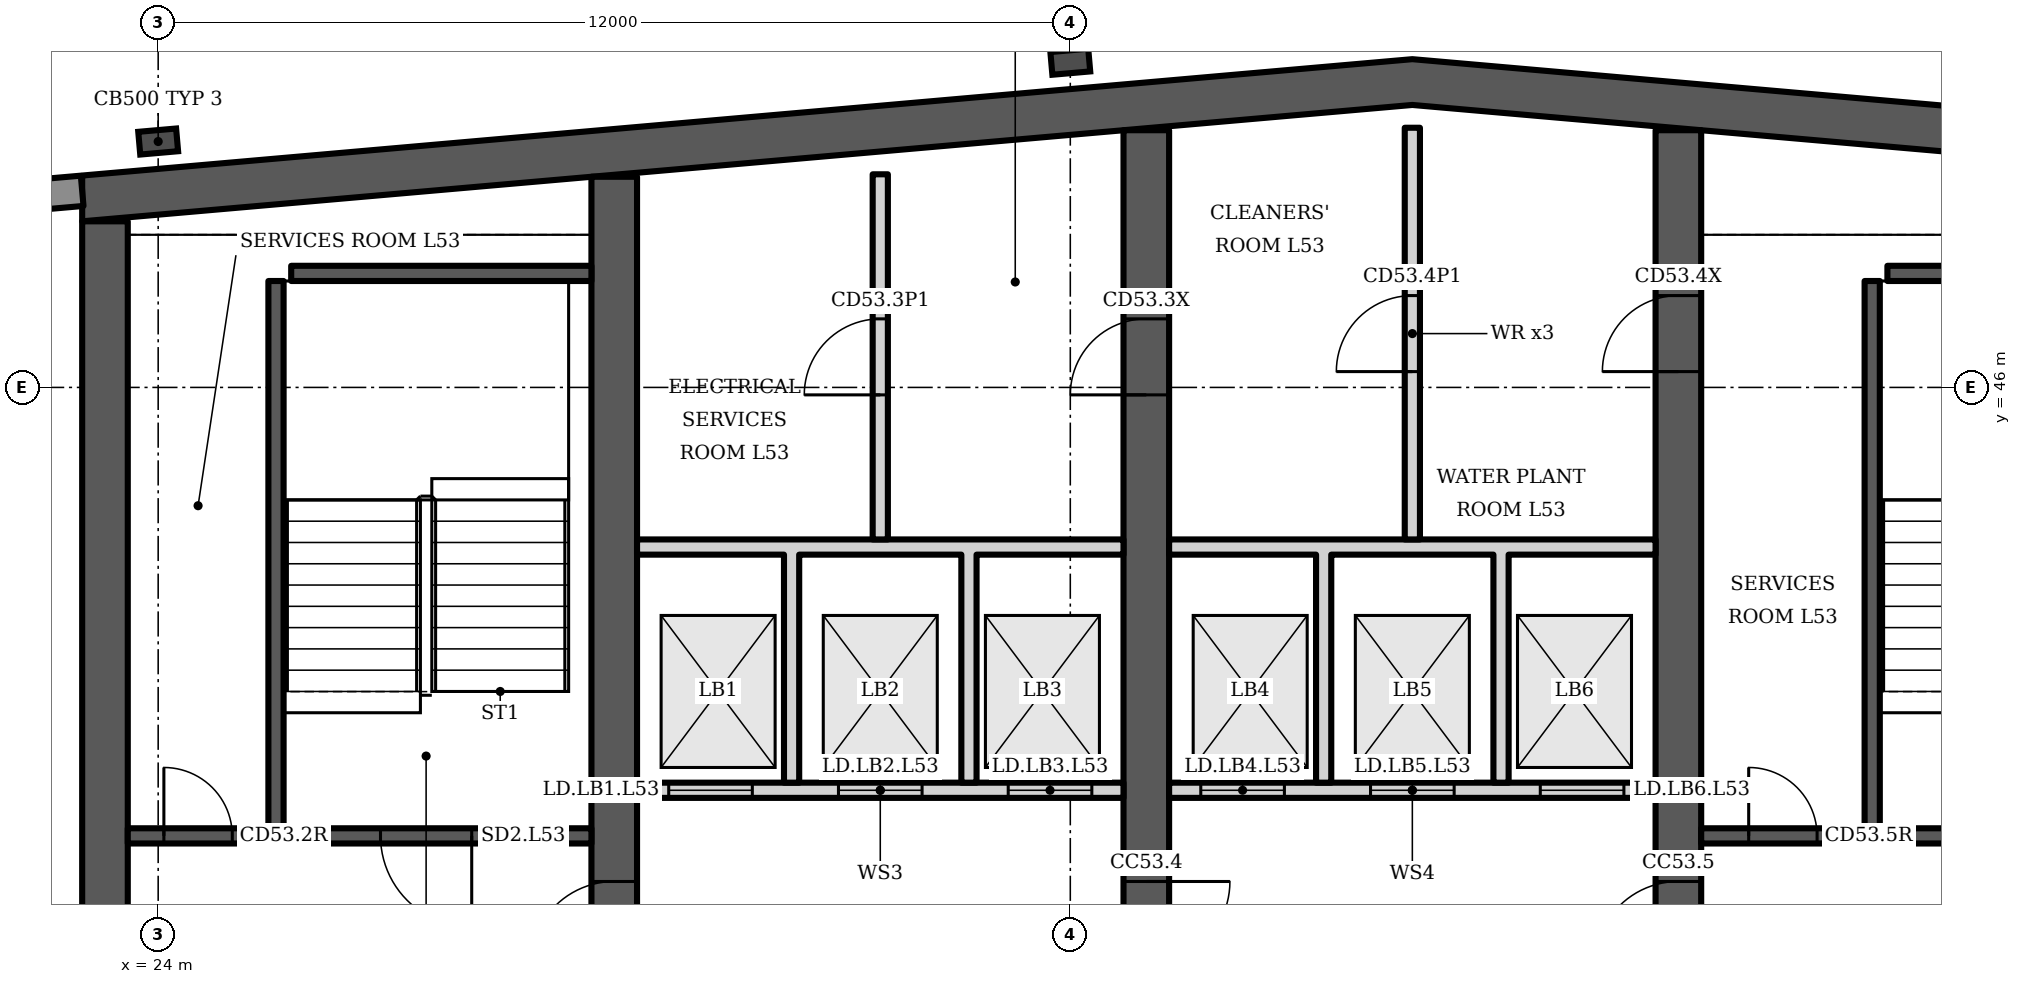
"""IFC4 building model, lengths in metres.
Left out: names, types, materials, properties, quantities, classifications, styles, units other than length and angle.
Written with IfcOpenShell. Run it as: python <this file> out.ifc"""

import sys

from ifc_helpers import new_model, si_unit, direction, frame, frame_2d, origin, origin_2d, place, context, subcontext, project, spatial, polyline, rectangle, i_section, outline, extrude, element, fill, save


model = new_model("IFC4")
c1 = context("Model", 3, precision=1e-05, world=origin(), true_north=direction((0.0, 1.0)))
c2 = subcontext(c1, "Body", "Model", "MODEL_VIEW")
j1 = project(units=[si_unit("LENGTHUNIT", "METRE"), si_unit("PLANEANGLEUNIT", "RADIAN")], contexts=[c1])
p1 = place(None, origin())
s1 = spatial("IfcSite", under=j1, at=p1, CompositionType="ELEMENT")
p2 = place(p1, origin())
s2 = spatial("IfcBuilding", under=s1, at=p2, CompositionType="ELEMENT")
p3 = place(p2, frame((0.0, 0.0, 214.3)))
s3 = spatial("IfcBuildingStorey", under=s2, at=p3, CompositionType="ELEMENT", Elevation=214.3)
p4 = place(p3, frame((0.0, 0.0, -0.0)))
e1 = element("IfcWall", 1, at=p4, inside=s3, PredefinedType="SHEAR", context=c2, shape_type="SweptSolid", body=[
    extrude(outline(polyline([(23.0, 48.185), (40.5, 49.716), (58.0, 48.185), (58.0, 48.787), (40.5, 50.318), (23.0, 48.787), (23.0, 48.185)])), origin(), (0.0, 0.0, 1.0), 3.6),
])
p5 = place(p3, frame((23.3, 34.6, 0.0), z_axis=(0.0, 0.0, 1.0), x_axis=(0.0, 1.0, 0.0)))
e2 = element("IfcWall", 2, at=p5, inside=s3, PredefinedType="SHEAR", context=c2, shape_type="SweptSolid", body=[
    extrude(rectangle(XDim=13.585, YDim=0.6, at=frame_2d((6.792, 0.0))), origin(), (0.0, 0.0, 1.0), 3.6),
])
p6 = place(p3, frame((30.0, 34.6, 0.0), z_axis=(0.0, 0.0, 1.0), x_axis=(0.0, 1.0, 0.0)))
e3 = element("IfcWall", 3, at=p6, inside=s3, PredefinedType="SHEAR", context=c2, shape_type="SweptSolid", body=[
    extrude(rectangle(XDim=14.171, YDim=0.6, at=frame_2d((7.085, 0.0))), origin(), (0.0, 0.0, 1.0), 3.6),
])
p7 = place(p6, frame((3.8, 0.0, 0.0)))
e4 = element("IfcOpeningElement", 4, at=p7, cuts=e3, PredefinedType="OPENING", context=c2, shape_type="SweptSolid", body=[
    extrude(rectangle(XDim=1.1, YDim=2.1, at=frame_2d((0.55, 1.05))), frame((0.0, 0.31, 0.0), z_axis=(0.0, -1.0, 0.0), x_axis=(1.0, 0.0, 0.0)), (0.0, 0.0, 1.0), 0.62),
])
p8 = place(p3, frame((37.0, 34.6, 0.0), z_axis=(0.0, 0.0, 1.0), x_axis=(0.0, 1.0, 0.0)))
e5 = element("IfcWall", 5, at=p8, inside=s3, PredefinedType="SHEAR", context=c2, shape_type="SweptSolid", body=[
    extrude(rectangle(XDim=14.784, YDim=0.6, at=frame_2d((7.392, 0.0))), origin(), (0.0, 0.0, 1.0), 3.6),
])
p9 = place(p8, frame((11.302, 0.0, 0.0)))
e6 = element("IfcOpeningElement", 6, at=p9, cuts=e5, PredefinedType="OPENING", context=c2, shape_type="SweptSolid", body=[
    extrude(rectangle(XDim=1.0, YDim=2.1, at=frame_2d((0.5, 1.05))), frame((0.0, 0.31, 0.0), z_axis=(0.0, -1.0, 0.0), x_axis=(1.0, 0.0, 0.0)), (0.0, 0.0, 1.0), 0.62),
])
p10 = place(p8, frame((3.8, 0.0, 0.0)))
e7 = element("IfcOpeningElement", 7, at=p10, cuts=e5, PredefinedType="OPENING", context=c2, shape_type="SweptSolid", body=[
    extrude(rectangle(XDim=1.1, YDim=2.1, at=frame_2d((0.55, 1.05))), frame((0.0, 0.31, 0.0), z_axis=(0.0, -1.0, 0.0), x_axis=(1.0, 0.0, 0.0)), (0.0, 0.0, 1.0), 0.62),
])
p11 = place(p3, frame((44.0, 34.6, 0.0), z_axis=(0.0, 0.0, 1.0), x_axis=(0.0, 1.0, 0.0)))
e8 = element("IfcWall", 8, at=p11, inside=s3, PredefinedType="SHEAR", context=c2, shape_type="SweptSolid", body=[
    extrude(rectangle(XDim=14.784, YDim=0.6, at=frame_2d((7.392, 0.0))), origin(), (0.0, 0.0, 1.0), 3.6),
])
p12 = place(p11, frame((11.608, 0.0, 0.0)))
e9 = element("IfcOpeningElement", 9, at=p12, cuts=e8, PredefinedType="OPENING", context=c2, shape_type="SweptSolid", body=[
    extrude(rectangle(XDim=1.0, YDim=2.1, at=frame_2d((0.5, 1.05))), frame((0.0, 0.31, 0.0), z_axis=(0.0, -1.0, 0.0), x_axis=(1.0, 0.0, 0.0)), (0.0, 0.0, 1.0), 0.62),
])
p13 = place(p11, frame((3.8, 0.0, 0.0)))
e10 = element("IfcOpeningElement", 10, at=p13, cuts=e8, PredefinedType="OPENING", context=c2, shape_type="SweptSolid", body=[
    extrude(rectangle(XDim=1.1, YDim=2.1, at=frame_2d((0.55, 1.05))), frame((0.0, 0.31, 0.0), z_axis=(0.0, -1.0, 0.0), x_axis=(1.0, 0.0, 0.0)), (0.0, 0.0, 1.0), 0.62),
])
for number, where, z_axis, x_axis in (
    (11, (24.0, 49.235, 0.0), (0.0, 0.0, 1.0), (-0.087, 0.996, 0.0)),
    (12, (36.0, 50.285, 0.0), (0.0, 0.0, 1.0), (-0.087, 0.996, 0.0)),
):
    element("IfcColumn", number, at=place(p3, frame(where, z_axis=z_axis, x_axis=x_axis)), inside=s3, PredefinedType="COLUMN", context=c2, shape_type="SweptSolid", body=[
        extrude(i_section(OverallWidth=0.3, OverallDepth=0.5, WebThickness=0.014, FlangeThickness=0.028, FilletRadius=0.027, at=origin_2d()), origin(), (0.0, 0.0, 1.0), 3.6),
    ])
p14 = place(p3, frame((23.0, 48.587, 0.0), z_axis=(0.0, 0.0, 1.0), x_axis=(-0.996194, -0.087168, 0.0)))
e13 = element("IfcWall", 13, at=p14, inside=s3, PredefinedType="SOLIDWALL", context=c2, shape_type="SweptSolid", body=[
    extrude(rectangle(XDim=2.994, YDim=0.4, at=frame_2d((1.497, 0.0))), origin(), (0.0, 0.0, 1.0), 3.2),
])
p15 = place(p3, frame((23.6, 40.1, 0.0), z_axis=(0.0, 0.0, 1.0), x_axis=(1.0, 0.0, 0.0)))
e14 = element("IfcWall", 14, at=p15, inside=s3, PredefinedType="SHEAR", context=c2, shape_type="SweptSolid", body=[
    extrude(rectangle(XDim=6.1, YDim=0.2, at=frame_2d((3.05, 0.0))), origin(), (0.0, 0.0, 1.0), 3.2),
])
p16 = place(p15, frame((3.325, 0.0, 0.0)))
e15 = element("IfcOpeningElement", 15, at=p16, cuts=e14, PredefinedType="OPENING", context=c2, shape_type="SweptSolid", body=[
    extrude(rectangle(XDim=1.2, YDim=2.1, at=frame_2d((0.6, 1.05))), frame((0.0, 0.11, 0.0), z_axis=(0.0, -1.0, 0.0), x_axis=(1.0, 0.0, 0.0)), (0.0, 0.0, 1.0), 0.22),
])
p17 = place(p15, frame((0.475, 0.0, 0.0)))
e16 = element("IfcOpeningElement", 16, at=p17, cuts=e14, PredefinedType="OPENING", context=c2, shape_type="SweptSolid", body=[
    extrude(rectangle(XDim=0.9, YDim=2.1, at=frame_2d((0.45, 1.05))), frame((0.0, 0.11, 0.0), z_axis=(0.0, -1.0, 0.0), x_axis=(1.0, 0.0, 0.0)), (0.0, 0.0, 1.0), 0.22),
])
p18 = place(p3, frame((25.55, 40.2, 0.0), z_axis=(0.0, 0.0, 1.0), x_axis=(0.0, 1.0, 0.0)))
e17 = element("IfcWall", 17, at=p18, inside=s3, PredefinedType="SHEAR", context=c2, shape_type="SweptSolid", body=[
    extrude(rectangle(XDim=7.2, YDim=0.2, at=frame_2d((3.6, 0.0))), origin(), (0.0, 0.0, 1.0), 3.2),
])
p19 = place(p3, frame((25.75, 47.5, 0.0), z_axis=(0.0, 0.0, 1.0), x_axis=(1.0, 0.0, 0.0)))
e18 = element("IfcWall", 18, at=p19, inside=s3, PredefinedType="SHEAR", context=c2, shape_type="SweptSolid", body=[
    extrude(rectangle(XDim=3.95, YDim=0.2, at=frame_2d((1.975, 0.0))), origin(), (0.0, 0.0, 1.0), 3.2),
])
p20 = place(p3, frame((30.3, 40.7, 0.0), z_axis=(0.0, 0.0, 1.0), x_axis=(1.0, 0.0, 0.0)))
e19 = element("IfcWall", 19, at=p20, inside=s3, PredefinedType="PARTITIONING", context=c2, shape_type="SweptSolid", body=[
    extrude(rectangle(XDim=6.4, YDim=0.2, at=frame_2d((3.2, 0.0))), origin(), (0.0, 0.0, 1.0), 3.2),
])
p21 = place(p20, frame((0.417, 0.0, 0.0)))
e20 = element("IfcOpeningElement", 20, at=p21, cuts=e19, PredefinedType="OPENING", context=c2, shape_type="SweptSolid", body=[
    extrude(rectangle(XDim=1.1, YDim=2.1, at=frame_2d((0.55, 1.05))), frame((0.0, 0.11, 0.0), z_axis=(0.0, -1.0, 0.0), x_axis=(1.0, 0.0, 0.0)), (0.0, 0.0, 1.0), 0.22),
])
p22 = place(p20, frame((2.65, 0.0, 0.0)))
e21 = element("IfcOpeningElement", 21, at=p22, cuts=e19, PredefinedType="OPENING", context=c2, shape_type="SweptSolid", body=[
    extrude(rectangle(XDim=1.1, YDim=2.1, at=frame_2d((0.55, 1.05))), frame((0.0, 0.11, 0.0), z_axis=(0.0, -1.0, 0.0), x_axis=(1.0, 0.0, 0.0)), (0.0, 0.0, 1.0), 0.22),
])
p23 = place(p20, frame((4.883, 0.0, 0.0)))
e22 = element("IfcOpeningElement", 22, at=p23, cuts=e19, PredefinedType="OPENING", context=c2, shape_type="SweptSolid", body=[
    extrude(rectangle(XDim=1.1, YDim=2.1, at=frame_2d((0.55, 1.05))), frame((0.0, 0.11, 0.0), z_axis=(0.0, -1.0, 0.0), x_axis=(1.0, 0.0, 0.0)), (0.0, 0.0, 1.0), 0.22),
])
p24 = place(p3, frame((0.0, 0.0, -0.0)))
e23 = element("IfcWall", 23, at=p24, inside=s3, PredefinedType="PARTITIONING", context=c2, shape_type="SweptSolid", body=[
    extrude(outline(polyline([(32.433, 40.8), (32.233, 40.8), (32.233, 43.8), (30.3, 43.8), (30.3, 44.0), (36.7, 44.0), (36.7, 43.8), (34.767, 43.8), (34.767, 40.8), (34.567, 40.8), (34.567, 43.8), (32.433, 43.8), (32.433, 40.8)])), origin(), (0.0, 0.0, 1.0), 3.2),
])
p25 = place(p3, frame((33.5, 44.0, 0.0), z_axis=(0.0, 0.0, 1.0), x_axis=(0.0, 1.0, 0.0)))
e24 = element("IfcWall", 24, at=p25, inside=s3, PredefinedType="PARTITIONING", context=c2, shape_type="SweptSolid", body=[
    extrude(rectangle(XDim=4.804, YDim=0.2, at=frame_2d((2.402, 0.0))), origin(), (0.0, 0.0, 1.0), 3.2),
])
p26 = place(p25, frame((1.902, 0.0, 0.0)))
e25 = element("IfcOpeningElement", 25, at=p26, cuts=e24, PredefinedType="OPENING", context=c2, shape_type="SweptSolid", body=[
    extrude(rectangle(XDim=1.0, YDim=2.1, at=frame_2d((0.5, 1.05))), frame((0.0, 0.11, 0.0), z_axis=(0.0, -1.0, 0.0), x_axis=(1.0, 0.0, 0.0)), (0.0, 0.0, 1.0), 0.22),
])
p27 = place(p3, frame((37.3, 40.7, 0.0), z_axis=(0.0, 0.0, 1.0), x_axis=(1.0, 0.0, 0.0)))
e26 = element("IfcWall", 26, at=p27, inside=s3, PredefinedType="PARTITIONING", context=c2, shape_type="SweptSolid", body=[
    extrude(rectangle(XDim=6.4, YDim=0.2, at=frame_2d((3.2, 0.0))), origin(), (0.0, 0.0, 1.0), 3.2),
])
p28 = place(p27, frame((0.417, 0.0, 0.0)))
e27 = element("IfcOpeningElement", 27, at=p28, cuts=e26, PredefinedType="OPENING", context=c2, shape_type="SweptSolid", body=[
    extrude(rectangle(XDim=1.1, YDim=2.1, at=frame_2d((0.55, 1.05))), frame((0.0, 0.11, 0.0), z_axis=(0.0, -1.0, 0.0), x_axis=(1.0, 0.0, 0.0)), (0.0, 0.0, 1.0), 0.22),
])
p29 = place(p27, frame((2.65, 0.0, 0.0)))
e28 = element("IfcOpeningElement", 28, at=p29, cuts=e26, PredefinedType="OPENING", context=c2, shape_type="SweptSolid", body=[
    extrude(rectangle(XDim=1.1, YDim=2.1, at=frame_2d((0.55, 1.05))), frame((0.0, 0.11, 0.0), z_axis=(0.0, -1.0, 0.0), x_axis=(1.0, 0.0, 0.0)), (0.0, 0.0, 1.0), 0.22),
])
p30 = place(p27, frame((4.883, 0.0, 0.0)))
e29 = element("IfcOpeningElement", 29, at=p30, cuts=e26, PredefinedType="OPENING", context=c2, shape_type="SweptSolid", body=[
    extrude(rectangle(XDim=1.1, YDim=2.1, at=frame_2d((0.55, 1.05))), frame((0.0, 0.11, 0.0), z_axis=(0.0, -1.0, 0.0), x_axis=(1.0, 0.0, 0.0)), (0.0, 0.0, 1.0), 0.22),
])
p31 = place(p3, frame((0.0, 0.0, -0.0)))
e30 = element("IfcWall", 30, at=p31, inside=s3, PredefinedType="PARTITIONING", context=c2, shape_type="SweptSolid", body=[
    extrude(outline(polyline([(39.433, 40.8), (39.233, 40.8), (39.233, 43.8), (37.3, 43.8), (37.3, 44.0), (43.7, 44.0), (43.7, 43.8), (41.767, 43.8), (41.767, 40.8), (41.567, 40.8), (41.567, 43.8), (39.433, 43.8), (39.433, 40.8)])), origin(), (0.0, 0.0, 1.0), 3.2),
])
p32 = place(p3, frame((40.5, 44.0, 0.0), z_axis=(0.0, 0.0, 1.0), x_axis=(0.0, 1.0, 0.0)))
e31 = element("IfcWall", 31, at=p32, inside=s3, PredefinedType="PARTITIONING", context=c2, shape_type="SweptSolid", body=[
    extrude(rectangle(XDim=5.416, YDim=0.2, at=frame_2d((2.708, 0.0))), origin(), (0.0, 0.0, 1.0), 3.2),
])
p33 = place(p32, frame((2.208, 0.0, 0.0)))
e32 = element("IfcOpeningElement", 32, at=p33, cuts=e31, PredefinedType="OPENING", context=c2, shape_type="SweptSolid", body=[
    extrude(rectangle(XDim=1.0, YDim=2.1, at=frame_2d((0.5, 1.05))), frame((0.0, 0.11, 0.0), z_axis=(0.0, -1.0, 0.0), x_axis=(1.0, 0.0, 0.0)), (0.0, 0.0, 1.0), 0.22),
])
p34 = place(p3, frame((44.3, 40.1, 0.0), z_axis=(0.0, 0.0, 1.0), x_axis=(1.0, 0.0, 0.0)))
e33 = element("IfcWall", 33, at=p34, inside=s3, PredefinedType="SHEAR", context=c2, shape_type="SweptSolid", body=[
    extrude(rectangle(XDim=6.4, YDim=0.2, at=frame_2d((3.2, 0.0))), origin(), (0.0, 0.0, 1.0), 3.2),
])
p35 = place(p34, frame((3.625, 0.0, 0.0)))
e34 = element("IfcOpeningElement", 34, at=p35, cuts=e33, PredefinedType="OPENING", context=c2, shape_type="SweptSolid", body=[
    extrude(rectangle(XDim=1.2, YDim=2.1, at=frame_2d((0.6, 1.05))), frame((0.0, 0.11, 0.0), z_axis=(0.0, -1.0, 0.0), x_axis=(1.0, 0.0, 0.0)), (0.0, 0.0, 1.0), 0.22),
])
p36 = place(p34, frame((0.625, 0.0, 0.0)))
e35 = element("IfcOpeningElement", 35, at=p36, cuts=e33, PredefinedType="OPENING", context=c2, shape_type="SweptSolid", body=[
    extrude(rectangle(XDim=0.9, YDim=2.1, at=frame_2d((0.45, 1.05))), frame((0.0, 0.11, 0.0), z_axis=(0.0, -1.0, 0.0), x_axis=(1.0, 0.0, 0.0)), (0.0, 0.0, 1.0), 0.22),
])
p37 = place(p3, frame((46.55, 40.2, 0.0), z_axis=(0.0, 0.0, 1.0), x_axis=(0.0, 1.0, 0.0)))
e36 = element("IfcWall", 36, at=p37, inside=s3, PredefinedType="SHEAR", context=c2, shape_type="SweptSolid", body=[
    extrude(rectangle(XDim=7.2, YDim=0.2, at=frame_2d((3.6, 0.0))), origin(), (0.0, 0.0, 1.0), 3.2),
])
p38 = place(p3, frame((46.75, 47.5, 0.0), z_axis=(0.0, 0.0, 1.0), x_axis=(1.0, 0.0, 0.0)))
e37 = element("IfcWall", 37, at=p38, inside=s3, PredefinedType="SHEAR", context=c2, shape_type="SweptSolid", body=[
    extrude(rectangle(XDim=3.95, YDim=0.2, at=frame_2d((1.975, 0.0))), origin(), (0.0, 0.0, 1.0), 3.2),
])
p39 = place(p16, origin())
e38 = element("IfcDoor", 38, at=p39, inside=s3, OperationType="SINGLE_SWING_RIGHT", PredefinedType="DOOR", context=c2, shape_type="SweptSolid", body=[
    extrude(rectangle(XDim=1.2, YDim=2.1, at=frame_2d((0.6, 1.05))), frame((0.0, 0.025, 0.0), z_axis=(0.0, -1.0, 0.0), x_axis=(1.0, 0.0, 0.0)), (0.0, 0.0, 1.0), 0.05),
])
fill(e15, e38)
p40 = place(p17, origin())
e39 = element("IfcDoor", 39, at=p40, inside=s3, OperationType="SINGLE_SWING_LEFT", PredefinedType="DOOR", context=c2, shape_type="SweptSolid", body=[
    extrude(rectangle(XDim=0.9, YDim=2.1, at=frame_2d((0.45, 1.05))), frame((0.0, 0.025, 0.0), z_axis=(0.0, -1.0, 0.0), x_axis=(1.0, 0.0, 0.0)), (0.0, 0.0, 1.0), 0.05),
])
fill(e16, e39)
p41 = place(p21, origin())
e40 = element("IfcDoor", 40, at=p41, inside=s3, OperationType="DOUBLE_DOOR_SLIDING", PredefinedType="DOOR", context=c2, shape_type="SweptSolid", body=[
    extrude(rectangle(XDim=1.1, YDim=2.1, at=frame_2d((0.55, 1.05))), frame((0.0, 0.025, 0.0), z_axis=(0.0, -1.0, 0.0), x_axis=(1.0, 0.0, 0.0)), (0.0, 0.0, 1.0), 0.05),
])
fill(e20, e40)
p42 = place(p22, origin())
e41 = element("IfcDoor", 41, at=p42, inside=s3, OperationType="DOUBLE_DOOR_SLIDING", PredefinedType="DOOR", context=c2, shape_type="SweptSolid", body=[
    extrude(rectangle(XDim=1.1, YDim=2.1, at=frame_2d((0.55, 1.05))), frame((0.0, 0.025, 0.0), z_axis=(0.0, -1.0, 0.0), x_axis=(1.0, 0.0, 0.0)), (0.0, 0.0, 1.0), 0.05),
])
fill(e21, e41)
p43 = place(p23, origin())
e42 = element("IfcDoor", 42, at=p43, inside=s3, OperationType="DOUBLE_DOOR_SLIDING", PredefinedType="DOOR", context=c2, shape_type="SweptSolid", body=[
    extrude(rectangle(XDim=1.1, YDim=2.1, at=frame_2d((0.55, 1.05))), frame((0.0, 0.025, 0.0), z_axis=(0.0, -1.0, 0.0), x_axis=(1.0, 0.0, 0.0)), (0.0, 0.0, 1.0), 0.05),
])
fill(e22, e42)
p44 = place(p26, origin())
e43 = element("IfcDoor", 43, at=p44, inside=s3, OperationType="SINGLE_SWING_LEFT", PredefinedType="DOOR", context=c2, shape_type="SweptSolid", body=[
    extrude(rectangle(XDim=1.0, YDim=2.1, at=frame_2d((0.5, 1.05))), frame((0.0, 0.025, 0.0), z_axis=(0.0, -1.0, 0.0), x_axis=(1.0, 0.0, 0.0)), (0.0, 0.0, 1.0), 0.05),
])
fill(e25, e43)
p45 = place(p9, origin())
e44 = element("IfcDoor", 44, at=p45, inside=s3, OperationType="SINGLE_SWING_LEFT", PredefinedType="DOOR", context=c2, shape_type="SweptSolid", body=[
    extrude(rectangle(XDim=1.0, YDim=2.1, at=frame_2d((0.5, 1.05))), frame((0.0, 0.025, 0.0), z_axis=(0.0, -1.0, 0.0), x_axis=(1.0, 0.0, 0.0)), (0.0, 0.0, 1.0), 0.05),
])
fill(e6, e44)
p46 = place(p28, origin())
e45 = element("IfcDoor", 45, at=p46, inside=s3, OperationType="DOUBLE_DOOR_SLIDING", PredefinedType="DOOR", context=c2, shape_type="SweptSolid", body=[
    extrude(rectangle(XDim=1.1, YDim=2.1, at=frame_2d((0.55, 1.05))), frame((0.0, 0.025, 0.0), z_axis=(0.0, -1.0, 0.0), x_axis=(1.0, 0.0, 0.0)), (0.0, 0.0, 1.0), 0.05),
])
fill(e27, e45)
p47 = place(p29, origin())
e46 = element("IfcDoor", 46, at=p47, inside=s3, OperationType="DOUBLE_DOOR_SLIDING", PredefinedType="DOOR", context=c2, shape_type="SweptSolid", body=[
    extrude(rectangle(XDim=1.1, YDim=2.1, at=frame_2d((0.55, 1.05))), frame((0.0, 0.025, 0.0), z_axis=(0.0, -1.0, 0.0), x_axis=(1.0, 0.0, 0.0)), (0.0, 0.0, 1.0), 0.05),
])
fill(e28, e46)
p48 = place(p30, origin())
e47 = element("IfcDoor", 47, at=p48, inside=s3, OperationType="DOUBLE_DOOR_SLIDING", PredefinedType="DOOR", context=c2, shape_type="SweptSolid", body=[
    extrude(rectangle(XDim=1.1, YDim=2.1, at=frame_2d((0.55, 1.05))), frame((0.0, 0.025, 0.0), z_axis=(0.0, -1.0, 0.0), x_axis=(1.0, 0.0, 0.0)), (0.0, 0.0, 1.0), 0.05),
])
fill(e29, e47)
p49 = place(p33, origin())
e48 = element("IfcDoor", 48, at=p49, inside=s3, OperationType="SINGLE_SWING_LEFT", PredefinedType="DOOR", context=c2, shape_type="SweptSolid", body=[
    extrude(rectangle(XDim=1.0, YDim=2.1, at=frame_2d((0.5, 1.05))), frame((0.0, 0.025, 0.0), z_axis=(0.0, -1.0, 0.0), x_axis=(1.0, 0.0, 0.0)), (0.0, 0.0, 1.0), 0.05),
])
fill(e32, e48)
p50 = place(p12, origin())
e49 = element("IfcDoor", 49, at=p50, inside=s3, OperationType="SINGLE_SWING_LEFT", PredefinedType="DOOR", context=c2, shape_type="SweptSolid", body=[
    extrude(rectangle(XDim=1.0, YDim=2.1, at=frame_2d((0.5, 1.05))), frame((0.0, 0.025, 0.0), z_axis=(0.0, -1.0, 0.0), x_axis=(1.0, 0.0, 0.0)), (0.0, 0.0, 1.0), 0.05),
])
fill(e9, e49)
p51 = place(p36, origin())
e50 = element("IfcDoor", 50, at=p51, inside=s3, OperationType="SINGLE_SWING_LEFT", PredefinedType="DOOR", context=c2, shape_type="SweptSolid", body=[
    extrude(rectangle(XDim=0.9, YDim=2.1, at=frame_2d((0.45, 1.05))), frame((0.0, 0.025, 0.0), z_axis=(0.0, -1.0, 0.0), x_axis=(1.0, 0.0, 0.0)), (0.0, 0.0, 1.0), 0.05),
])
fill(e35, e50)
p52 = place(p7, origin())
e51 = element("IfcDoor", 51, at=p52, inside=s3, OperationType="SINGLE_SWING_LEFT", PredefinedType="DOOR", context=c2, shape_type="SweptSolid", body=[
    extrude(rectangle(XDim=1.1, YDim=2.1, at=frame_2d((0.55, 1.05))), frame((0.0, 0.025, 0.0), z_axis=(0.0, -1.0, 0.0), x_axis=(1.0, 0.0, 0.0)), (0.0, 0.0, 1.0), 0.05),
])
fill(e4, e51)
p53 = place(p10, origin())
e52 = element("IfcDoor", 52, at=p53, inside=s3, OperationType="SINGLE_SWING_RIGHT", PredefinedType="DOOR", context=c2, shape_type="SweptSolid", body=[
    extrude(rectangle(XDim=1.1, YDim=2.1, at=frame_2d((0.55, 1.05))), frame((0.0, 0.025, 0.0), z_axis=(0.0, -1.0, 0.0), x_axis=(1.0, 0.0, 0.0)), (0.0, 0.0, 1.0), 0.05),
])
fill(e7, e52)
p54 = place(p13, origin())
e53 = element("IfcDoor", 53, at=p54, inside=s3, OperationType="SINGLE_SWING_LEFT", PredefinedType="DOOR", context=c2, shape_type="SweptSolid", body=[
    extrude(rectangle(XDim=1.1, YDim=2.1, at=frame_2d((0.55, 1.05))), frame((0.0, 0.025, 0.0), z_axis=(0.0, -1.0, 0.0), x_axis=(1.0, 0.0, 0.0)), (0.0, 0.0, 1.0), 0.05),
])
fill(e10, e53)
save(model, sys.argv[1])
